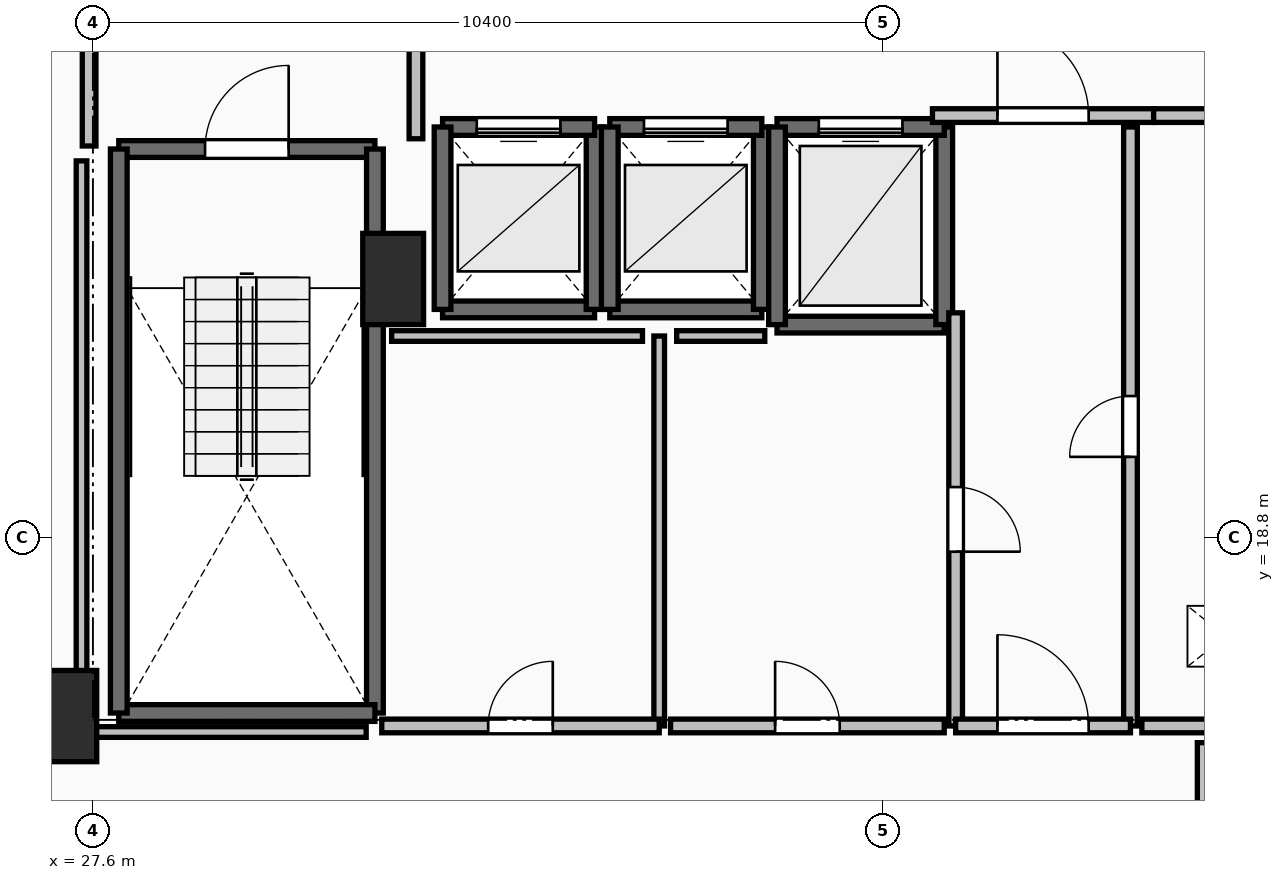
"""IFC4 building model, lengths in metres.
Left out: names, types, materials, properties, quantities, classifications, styles, units other than length and angle.
Written with IfcOpenShell. Run it as: python <this file> out.ifc"""

import sys

from ifc_helpers import new_model, si_unit, direction, frame, frame_2d, origin, origin_2d, place, context, subcontext, project, spatial, rectangle, extrude, element, fill, save


model = new_model("IFC4")
c1 = context("Model", 3, precision=1e-05, world=origin(), true_north=direction((0.0, 1.0)))
c2 = subcontext(c1, "Body", "Model", "MODEL_VIEW")
j1 = project(units=[si_unit("LENGTHUNIT", "METRE"), si_unit("PLANEANGLEUNIT", "RADIAN")], contexts=[c1])
p1 = place(None, origin())
s1 = spatial("IfcSite", under=j1, at=p1, CompositionType="ELEMENT")
p2 = place(p1, origin())
s2 = spatial("IfcBuilding", under=s1, at=p2, CompositionType="ELEMENT")
p3 = place(p2, frame((0.0, 0.0, 143.1)))
s3 = spatial("IfcBuildingStorey", under=s2, at=p3, CompositionType="ELEMENT", Elevation=143.1)
for number, where, z_axis, x_axis in (
    (1, (27.25, 16.45, 0.0), (0.0, 0.0, 1.0), (1.0, 0.0, 0.0)),
    (2, (31.55, 22.2, 0.0), (0.0, 0.0, 1.0), (1.0, 0.0, 0.0)),
):
    element("IfcColumn", number, at=place(p3, frame(where, z_axis=z_axis, x_axis=x_axis)), inside=s3, PredefinedType="PILASTER", context=c2, shape_type="SweptSolid", body=[
        extrude(rectangle(XDim=0.8, YDim=1.2, at=origin_2d()), origin(), (0.0, 0.0, 1.0), 3.5),
    ])
p4 = place(p3, frame((27.94, 23.91, 0.0), z_axis=(0.0, 0.0, 1.0), x_axis=(1.0, 0.0, 0.0)))
e3 = element("IfcWall", 3, at=p4, inside=s3, PredefinedType="SOLIDWALL", context=c2, shape_type="SweptSolid", body=[
    extrude(rectangle(XDim=3.37, YDim=0.22, at=frame_2d((1.685, 0.0))), origin(), (0.0, 0.0, 1.0), 3.24),
])
p5 = place(p4, frame((1.135, 0.0, 0.0)))
e4 = element("IfcOpeningElement", 4, at=p5, cuts=e3, PredefinedType="OPENING", context=c2, shape_type="SweptSolid", body=[
    extrude(rectangle(XDim=1.1, YDim=2.15, at=frame_2d((0.55, 1.075))), frame((0.0, 0.125, 0.0), z_axis=(0.0, -1.0, 0.0), x_axis=(1.0, 0.0, 0.0)), (0.0, 0.0, 1.0), 0.25),
])
p6 = place(p3, frame((31.31, 23.91, 0.0), z_axis=(0.0, 0.0, 1.0), x_axis=(0.0, -1.0, 0.0)))
e5 = element("IfcWall", 5, at=p6, inside=s3, PredefinedType="SOLIDWALL", context=c2, shape_type="SweptSolid", body=[
    extrude(rectangle(XDim=7.42, YDim=0.22, at=frame_2d((3.71, 0.0))), origin(), (0.0, 0.0, 1.0), 3.24),
])
p7 = place(p3, frame((31.31, 16.49, 0.0), z_axis=(0.0, 0.0, 1.0), x_axis=(-1.0, 0.0, 0.0)))
e6 = element("IfcWall", 6, at=p7, inside=s3, PredefinedType="SOLIDWALL", context=c2, shape_type="SweptSolid", body=[
    extrude(rectangle(XDim=3.37, YDim=0.22, at=frame_2d((1.685, 0.0))), origin(), (0.0, 0.0, 1.0), 3.24),
])
p8 = place(p3, frame((27.94, 16.49, 0.0), z_axis=(0.0, 0.0, 1.0), x_axis=(0.0, 1.0, 0.0)))
e7 = element("IfcWall", 7, at=p8, inside=s3, PredefinedType="SOLIDWALL", context=c2, shape_type="SweptSolid", body=[
    extrude(rectangle(XDim=7.42, YDim=0.22, at=frame_2d((3.71, 0.0))), origin(), (0.0, 0.0, 1.0), 3.24),
])
p9 = place(p3, frame((32.2, 21.8, 0.0), z_axis=(0.0, 0.0, 1.0), x_axis=(1.0, 0.0, 0.0)))
e8 = element("IfcWall", 8, at=p9, inside=s3, PredefinedType="SOLIDWALL", context=c2, shape_type="SweptSolid", body=[
    extrude(rectangle(XDim=2.0, YDim=0.22, at=frame_2d((1.0, 0.0))), origin(), (0.0, 0.0, 1.0), 3.24),
])
p10 = place(p3, frame((34.2, 21.8, 0.0), z_axis=(0.0, 0.0, 1.0), x_axis=(0.0, 1.0, 0.0)))
e9 = element("IfcWall", 9, at=p10, inside=s3, PredefinedType="SOLIDWALL", context=c2, shape_type="SweptSolid", body=[
    extrude(rectangle(XDim=2.4, YDim=0.22, at=frame_2d((1.2, 0.0))), origin(), (0.0, 0.0, 1.0), 3.24),
])
p11 = place(p3, frame((34.2, 24.2, 0.0), z_axis=(0.0, 0.0, 1.0), x_axis=(-1.0, 0.0, 0.0)))
e10 = element("IfcWall", 10, at=p11, inside=s3, PredefinedType="SOLIDWALL", context=c2, shape_type="SweptSolid", body=[
    extrude(rectangle(XDim=2.0, YDim=0.22, at=frame_2d((1.0, 0.0))), origin(), (0.0, 0.0, 1.0), 3.24),
])
p12 = place(p11, frame((0.45, 0.0, 0.0)))
e11 = element("IfcOpeningElement", 11, at=p12, cuts=e10, PredefinedType="OPENING", context=c2, shape_type="SweptSolid", body=[
    extrude(rectangle(XDim=1.1, YDim=2.2, at=frame_2d((0.55, 1.1))), frame((0.0, 0.125, 0.0), z_axis=(0.0, -1.0, 0.0), x_axis=(1.0, 0.0, 0.0)), (0.0, 0.0, 1.0), 0.25),
])
p13 = place(p3, frame((32.2, 24.2, 0.0), z_axis=(0.0, 0.0, 1.0), x_axis=(0.0, -1.0, 0.0)))
e12 = element("IfcWall", 12, at=p13, inside=s3, PredefinedType="SOLIDWALL", context=c2, shape_type="SweptSolid", body=[
    extrude(rectangle(XDim=2.4, YDim=0.22, at=frame_2d((1.2, 0.0))), origin(), (0.0, 0.0, 1.0), 3.24),
])
p14 = place(p3, frame((34.4, 21.8, 0.0), z_axis=(0.0, 0.0, 1.0), x_axis=(1.0, 0.0, 0.0)))
e13 = element("IfcWall", 13, at=p14, inside=s3, PredefinedType="SOLIDWALL", context=c2, shape_type="SweptSolid", body=[
    extrude(rectangle(XDim=2.0, YDim=0.22, at=frame_2d((1.0, 0.0))), origin(), (0.0, 0.0, 1.0), 3.24),
])
p15 = place(p3, frame((36.4, 21.8, 0.0), z_axis=(0.0, 0.0, 1.0), x_axis=(0.0, 1.0, 0.0)))
e14 = element("IfcWall", 14, at=p15, inside=s3, PredefinedType="SOLIDWALL", context=c2, shape_type="SweptSolid", body=[
    extrude(rectangle(XDim=2.4, YDim=0.22, at=frame_2d((1.2, 0.0))), origin(), (0.0, 0.0, 1.0), 3.24),
])
p16 = place(p3, frame((36.4, 24.2, 0.0), z_axis=(0.0, 0.0, 1.0), x_axis=(-1.0, 0.0, 0.0)))
e15 = element("IfcWall", 15, at=p16, inside=s3, PredefinedType="SOLIDWALL", context=c2, shape_type="SweptSolid", body=[
    extrude(rectangle(XDim=2.0, YDim=0.22, at=frame_2d((1.0, 0.0))), origin(), (0.0, 0.0, 1.0), 3.24),
])
p17 = place(p16, frame((0.45, 0.0, 0.0)))
e16 = element("IfcOpeningElement", 16, at=p17, cuts=e15, PredefinedType="OPENING", context=c2, shape_type="SweptSolid", body=[
    extrude(rectangle(XDim=1.1, YDim=2.2, at=frame_2d((0.55, 1.1))), frame((0.0, 0.125, 0.0), z_axis=(0.0, -1.0, 0.0), x_axis=(1.0, 0.0, 0.0)), (0.0, 0.0, 1.0), 0.25),
])
p18 = place(p3, frame((34.4, 24.2, 0.0), z_axis=(0.0, 0.0, 1.0), x_axis=(0.0, -1.0, 0.0)))
e17 = element("IfcWall", 17, at=p18, inside=s3, PredefinedType="SOLIDWALL", context=c2, shape_type="SweptSolid", body=[
    extrude(rectangle(XDim=2.4, YDim=0.22, at=frame_2d((1.2, 0.0))), origin(), (0.0, 0.0, 1.0), 3.24),
])
p19 = place(p3, frame((36.6, 21.6, 0.0), z_axis=(0.0, 0.0, 1.0), x_axis=(1.0, 0.0, 0.0)))
e18 = element("IfcWall", 18, at=p19, inside=s3, PredefinedType="SOLIDWALL", context=c2, shape_type="SweptSolid", body=[
    extrude(rectangle(XDim=2.2, YDim=0.22, at=frame_2d((1.1, 0.0))), origin(), (0.0, 0.0, 1.0), 3.24),
])
p20 = place(p3, frame((38.8, 21.6, 0.0), z_axis=(0.0, 0.0, 1.0), x_axis=(0.0, 1.0, 0.0)))
e19 = element("IfcWall", 19, at=p20, inside=s3, PredefinedType="SOLIDWALL", context=c2, shape_type="SweptSolid", body=[
    extrude(rectangle(XDim=2.6, YDim=0.22, at=frame_2d((1.3, 0.0))), origin(), (0.0, 0.0, 1.0), 3.24),
])
p21 = place(p3, frame((38.8, 24.2, 0.0), z_axis=(0.0, 0.0, 1.0), x_axis=(-1.0, 0.0, 0.0)))
e20 = element("IfcWall", 20, at=p21, inside=s3, PredefinedType="SOLIDWALL", context=c2, shape_type="SweptSolid", body=[
    extrude(rectangle(XDim=2.2, YDim=0.22, at=frame_2d((1.1, 0.0))), origin(), (0.0, 0.0, 1.0), 3.24),
])
p22 = place(p21, frame((0.55, 0.0, 0.0)))
e21 = element("IfcOpeningElement", 21, at=p22, cuts=e20, PredefinedType="OPENING", context=c2, shape_type="SweptSolid", body=[
    extrude(rectangle(XDim=1.1, YDim=2.2, at=frame_2d((0.55, 1.1))), frame((0.0, 0.125, 0.0), z_axis=(0.0, -1.0, 0.0), x_axis=(1.0, 0.0, 0.0)), (0.0, 0.0, 1.0), 0.25),
])
p23 = place(p3, frame((36.6, 24.2, 0.0), z_axis=(0.0, 0.0, 1.0), x_axis=(0.0, -1.0, 0.0)))
e22 = element("IfcWall", 22, at=p23, inside=s3, PredefinedType="SOLIDWALL", context=c2, shape_type="SweptSolid", body=[
    extrude(rectangle(XDim=2.6, YDim=0.22, at=frame_2d((1.3, 0.0))), origin(), (0.0, 0.0, 1.0), 3.24),
])
p24 = place(p3, frame((31.85, 24.045, 0.0), z_axis=(0.0, 0.0, 1.0), x_axis=(0.0, 1.0, 0.0)))
e23 = element("IfcWall", 23, at=p24, inside=s3, PredefinedType="PARTITIONING", context=c2, shape_type="SweptSolid", body=[
    extrude(rectangle(XDim=3.91, YDim=0.18, at=frame_2d((1.955, 0.0))), origin(), (0.0, 0.0, 1.0), 3.24),
])
p25 = place(p24, frame((1.355, 0.0, 0.0)))
e24 = element("IfcOpeningElement", 24, at=p25, cuts=e23, PredefinedType="OPENING", context=c2, shape_type="SweptSolid", body=[
    extrude(rectangle(XDim=1.2, YDim=2.15, at=frame_2d((0.6, 1.075))), frame((0.0, 0.105, 0.0), z_axis=(0.0, -1.0, 0.0), x_axis=(1.0, 0.0, 0.0)), (0.0, 0.0, 1.0), 0.21),
])
p26 = place(p3, frame((27.55, 28.0, 0.0), z_axis=(0.0, 0.0, 1.0), x_axis=(0.0, -1.0, 0.0)))
e25 = element("IfcWall", 25, at=p26, inside=s3, PredefinedType="PARTITIONING", context=c2, shape_type="SweptSolid", body=[
    extrude(rectangle(XDim=4.05, YDim=0.18, at=frame_2d((2.025, 0.0))), origin(), (0.0, 0.0, 1.0), 3.24),
])
p27 = place(p26, frame((1.425, 0.0, 0.0)))
e26 = element("IfcOpeningElement", 26, at=p27, cuts=e25, PredefinedType="OPENING", context=c2, shape_type="SweptSolid", body=[
    extrude(rectangle(XDim=1.2, YDim=2.15, at=frame_2d((0.6, 1.075))), frame((0.0, 0.105, 0.0), z_axis=(0.0, -1.0, 0.0), x_axis=(1.0, 0.0, 0.0)), (0.0, 0.0, 1.0), 0.21),
])
p28 = place(p3, frame((38.645, 24.35, 0.0), z_axis=(0.0, 0.0, 1.0), x_axis=(1.0, 0.0, 0.0)))
e27 = element("IfcWall", 27, at=p28, inside=s3, PredefinedType="PARTITIONING", context=c2, shape_type="SweptSolid", body=[
    extrude(rectangle(XDim=2.91, YDim=0.18, at=frame_2d((1.455, 0.0))), origin(), (0.0, 0.0, 1.0), 3.24),
])
p29 = place(p28, frame((0.855, 0.0, 0.0)))
e28 = element("IfcOpeningElement", 28, at=p29, cuts=e27, PredefinedType="OPENING", context=c2, shape_type="SweptSolid", body=[
    extrude(rectangle(XDim=1.2, YDim=2.15, at=frame_2d((0.6, 1.075))), frame((0.0, 0.105, 0.0), z_axis=(0.0, -1.0, 0.0), x_axis=(1.0, 0.0, 0.0)), (0.0, 0.0, 1.0), 0.21),
])
p30 = place(p3, frame((41.555, 24.35, 0.0), z_axis=(0.0, 0.0, 1.0), x_axis=(1.0, 0.0, 0.0)))
e29 = element("IfcWall", 29, at=p30, inside=s3, PredefinedType="PARTITIONING", context=c2, shape_type="SweptSolid", body=[
    extrude(rectangle(XDim=2.445, YDim=0.18, at=frame_2d((1.223, 0.0))), origin(), (0.0, 0.0, 1.0), 3.24),
])
p31 = place(p30, frame((0.823, 0.0, 0.0)))
e30 = element("IfcOpeningElement", 30, at=p31, cuts=e29, PredefinedType="OPENING", context=c2, shape_type="SweptSolid", body=[
    extrude(rectangle(XDim=0.8, YDim=2.05, at=frame_2d((0.4, 1.025))), frame((0.0, 0.105, 0.0), z_axis=(0.0, -1.0, 0.0), x_axis=(1.0, 0.0, 0.0)), (0.0, 0.0, 1.0), 0.21),
])
p32 = place(p3, frame((41.25, 16.32, 0.0), z_axis=(0.0, 0.0, 1.0), x_axis=(0.0, 1.0, 0.0)))
e31 = element("IfcWall", 31, at=p32, inside=s3, PredefinedType="PARTITIONING", context=c2, shape_type="SweptSolid", body=[
    extrude(rectangle(XDim=7.88, YDim=0.18, at=frame_2d((3.94, 0.0))), origin(), (0.0, 0.0, 1.0), 3.24),
])
p33 = place(p32, frame((3.54, 0.0, 0.0)))
e32 = element("IfcOpeningElement", 32, at=p33, cuts=e31, PredefinedType="OPENING", context=c2, shape_type="SweptSolid", body=[
    extrude(rectangle(XDim=0.8, YDim=2.05, at=frame_2d((0.4, 1.025))), frame((0.0, 0.105, 0.0), z_axis=(0.0, -1.0, 0.0), x_axis=(1.0, 0.0, 0.0)), (0.0, 0.0, 1.0), 0.21),
])
p34 = place(p3, frame((38.95, 21.755, 0.0), z_axis=(0.0, 0.0, 1.0), x_axis=(0.0, -1.0, 0.0)))
e33 = element("IfcWall", 33, at=p34, inside=s3, PredefinedType="PARTITIONING", context=c2, shape_type="SweptSolid", body=[
    extrude(rectangle(XDim=5.435, YDim=0.18, at=frame_2d((2.717, 0.0))), origin(), (0.0, 0.0, 1.0), 3.24),
])
p35 = place(p34, frame((2.292, 0.0, 0.0)))
e34 = element("IfcOpeningElement", 34, at=p35, cuts=e33, PredefinedType="OPENING", context=c2, shape_type="SweptSolid", body=[
    extrude(rectangle(XDim=0.85, YDim=2.1, at=frame_2d((0.425, 1.05))), frame((0.0, 0.105, 0.0), z_axis=(0.0, -1.0, 0.0), x_axis=(1.0, 0.0, 0.0)), (0.0, 0.0, 1.0), 0.21),
])
p36 = place(p3, frame((38.95, 16.32, 0.0), z_axis=(0.0, 0.0, 1.0), x_axis=(1.0, 0.0, 0.0)))
e35 = element("IfcWall", 35, at=p36, inside=s3, PredefinedType="PARTITIONING", context=c2, shape_type="SweptSolid", body=[
    extrude(rectangle(XDim=2.3, YDim=0.18, at=frame_2d((1.15, 0.0))), origin(), (0.0, 0.0, 1.0), 3.24),
])
p37 = place(p36, frame((0.55, 0.0, 0.0)))
e36 = element("IfcOpeningElement", 36, at=p37, cuts=e35, PredefinedType="OPENING", context=c2, shape_type="SweptSolid", body=[
    extrude(rectangle(XDim=1.2, YDim=2.15, at=frame_2d((0.6, 1.075))), frame((0.0, 0.105, 0.0), z_axis=(0.0, -1.0, 0.0), x_axis=(1.0, 0.0, 0.0)), (0.0, 0.0, 1.0), 0.21),
])
p38 = place(p3, frame((41.4, 16.32, 0.0), z_axis=(0.0, 0.0, 1.0), x_axis=(1.0, 0.0, 0.0)))
e37 = element("IfcWall", 37, at=p38, inside=s3, PredefinedType="PARTITIONING", context=c2, shape_type="SweptSolid", body=[
    extrude(rectangle(XDim=3.2, YDim=0.18, at=frame_2d((1.6, 0.0))), origin(), (0.0, 0.0, 1.0), 3.24),
])
p39 = place(p38, frame((1.2, 0.0, 0.0)))
e38 = element("IfcOpeningElement", 38, at=p39, cuts=e37, PredefinedType="OPENING", context=c2, shape_type="SweptSolid", body=[
    extrude(rectangle(XDim=0.8, YDim=2.05, at=frame_2d((0.4, 1.025))), frame((0.0, 0.105, 0.0), z_axis=(0.0, -1.0, 0.0), x_axis=(1.0, 0.0, 0.0)), (0.0, 0.0, 1.0), 0.21),
])
p40 = place(p3, frame((35.05, 16.32, 0.0), z_axis=(0.0, 0.0, 1.0), x_axis=(0.0, 1.0, 0.0)))
e39 = element("IfcWall", 39, at=p40, inside=s3, PredefinedType="PARTITIONING", context=c2, shape_type="SweptSolid", body=[
    extrude(rectangle(XDim=5.13, YDim=0.14, at=frame_2d((2.565, 0.0))), origin(), (0.0, 0.0, 1.0), 3.24),
])
p41 = place(p3, frame((31.4, 16.32, 0.0), z_axis=(0.0, 0.0, 1.0), x_axis=(1.0, 0.0, 0.0)))
e40 = element("IfcWall", 40, at=p41, inside=s3, PredefinedType="PARTITIONING", context=c2, shape_type="SweptSolid", body=[
    extrude(rectangle(XDim=3.65, YDim=0.18, at=frame_2d((1.825, 0.0))), origin(), (0.0, 0.0, 1.0), 3.24),
])
p42 = place(p41, frame((1.4, 0.0, 0.0)))
e41 = element("IfcOpeningElement", 41, at=p42, cuts=e40, PredefinedType="OPENING", context=c2, shape_type="SweptSolid", body=[
    extrude(rectangle(XDim=0.85, YDim=2.1, at=frame_2d((0.425, 1.05))), frame((0.0, 0.105, 0.0), z_axis=(0.0, -1.0, 0.0), x_axis=(1.0, 0.0, 0.0)), (0.0, 0.0, 1.0), 0.21),
])
p43 = place(p3, frame((35.2, 16.32, 0.0), z_axis=(0.0, 0.0, 1.0), x_axis=(1.0, 0.0, 0.0)))
e42 = element("IfcWall", 42, at=p43, inside=s3, PredefinedType="PARTITIONING", context=c2, shape_type="SweptSolid", body=[
    extrude(rectangle(XDim=3.6, YDim=0.18, at=frame_2d((1.8, 0.0))), origin(), (0.0, 0.0, 1.0), 3.24),
])
p44 = place(p43, frame((1.375, 0.0, 0.0)))
e43 = element("IfcOpeningElement", 43, at=p44, cuts=e42, PredefinedType="OPENING", context=c2, shape_type="SweptSolid", body=[
    extrude(rectangle(XDim=0.85, YDim=2.1, at=frame_2d((0.425, 1.05))), frame((0.0, 0.105, 0.0), z_axis=(0.0, -1.0, 0.0), x_axis=(1.0, 0.0, 0.0)), (0.0, 0.0, 1.0), 0.21),
])
p45 = place(p3, frame((34.83, 21.45, 0.0), z_axis=(0.0, 0.0, 1.0), x_axis=(-1.0, 0.0, 0.0)))
e44 = element("IfcWall", 44, at=p45, inside=s3, PredefinedType="PARTITIONING", context=c2, shape_type="SweptSolid", body=[
    extrude(rectangle(XDim=3.3, YDim=0.14, at=frame_2d((1.65, 0.0))), origin(), (0.0, 0.0, 1.0), 3.24),
])
p46 = place(p3, frame((36.439, 21.45, 0.0), z_axis=(0.0, 0.0, 1.0), x_axis=(-1.0, 0.0, 0.0)))
e45 = element("IfcWall", 45, at=p46, inside=s3, PredefinedType="PARTITIONING", context=c2, shape_type="SweptSolid", body=[
    extrude(rectangle(XDim=1.159, YDim=0.14, at=frame_2d((0.58, 0.0))), origin(), (0.0, 0.0, 1.0), 3.24),
])
p47 = place(p3, frame((27.45, 23.754, 0.0), z_axis=(0.0, 0.0, 1.0), x_axis=(0.0, -1.0, 0.0)))
e46 = element("IfcWall", 46, at=p47, inside=s3, PredefinedType="PARTITIONING", context=c2, shape_type="SweptSolid", body=[
    extrude(rectangle(XDim=7.514, YDim=0.14, at=frame_2d((3.757, 0.0))), origin(), (0.0, 0.0, 1.0), 2.432),
])
p48 = place(p3, frame((27.45, 16.24, 0.0), z_axis=(0.0, 0.0, 1.0), x_axis=(1.0, 0.0, 0.0)))
e47 = element("IfcWall", 47, at=p48, inside=s3, PredefinedType="PARTITIONING", context=c2, shape_type="SweptSolid", body=[
    extrude(rectangle(XDim=3.745, YDim=0.14, at=frame_2d((1.873, 0.0))), origin(), (0.0, 0.0, 1.0), 2.432),
])
p49 = place(p3, frame((42.2, 16.1, 0.0), z_axis=(0.0, 0.0, 1.0), x_axis=(0.0, -1.0, 0.0)))
e48 = element("IfcWall", 48, at=p49, inside=s3, PredefinedType="PARTITIONING", context=c2, shape_type="SweptSolid", body=[
    extrude(rectangle(XDim=1.83, YDim=0.14, at=frame_2d((0.915, 0.0))), origin(), (0.0, 0.0, 1.0), 3.24),
])
p50 = place(p5, origin())
e49 = element("IfcDoor", 49, at=p50, inside=s3, OperationType="SINGLE_SWING_RIGHT", PredefinedType="DOOR", context=c2, shape_type="SweptSolid", body=[
    extrude(rectangle(XDim=1.1, YDim=2.15, at=frame_2d((0.55, 1.075))), frame((0.0, 0.025, 0.0), z_axis=(0.0, -1.0, 0.0), x_axis=(1.0, 0.0, 0.0)), (0.0, 0.0, 1.0), 0.05),
])
fill(e4, e49)
p51 = place(p12, origin())
e50 = element("IfcDoor", 50, at=p51, inside=s3, OperationType="SLIDING_TO_LEFT", PredefinedType="DOOR", context=c2, shape_type="SweptSolid", body=[
    extrude(rectangle(XDim=1.1, YDim=2.2, at=frame_2d((0.55, 1.1))), frame((0.0, 0.025, 0.0), z_axis=(0.0, -1.0, 0.0), x_axis=(1.0, 0.0, 0.0)), (0.0, 0.0, 1.0), 0.05),
])
fill(e11, e50)
p52 = place(p17, origin())
e51 = element("IfcDoor", 51, at=p52, inside=s3, OperationType="SLIDING_TO_LEFT", PredefinedType="DOOR", context=c2, shape_type="SweptSolid", body=[
    extrude(rectangle(XDim=1.1, YDim=2.2, at=frame_2d((0.55, 1.1))), frame((0.0, 0.025, 0.0), z_axis=(0.0, -1.0, 0.0), x_axis=(1.0, 0.0, 0.0)), (0.0, 0.0, 1.0), 0.05),
])
fill(e16, e51)
p53 = place(p22, origin())
e52 = element("IfcDoor", 52, at=p53, inside=s3, OperationType="SLIDING_TO_LEFT", PredefinedType="DOOR", context=c2, shape_type="SweptSolid", body=[
    extrude(rectangle(XDim=1.1, YDim=2.2, at=frame_2d((0.55, 1.1))), frame((0.0, 0.025, 0.0), z_axis=(0.0, -1.0, 0.0), x_axis=(1.0, 0.0, 0.0)), (0.0, 0.0, 1.0), 0.05),
])
fill(e21, e52)
p54 = place(p29, origin())
e53 = element("IfcDoor", 53, at=p54, inside=s3, OperationType="SINGLE_SWING_LEFT", PredefinedType="DOOR", context=c2, shape_type="SweptSolid", body=[
    extrude(rectangle(XDim=1.2, YDim=2.15, at=frame_2d((0.6, 1.075))), frame((0.0, 0.025, 0.0), z_axis=(0.0, -1.0, 0.0), x_axis=(1.0, 0.0, 0.0)), (0.0, 0.0, 1.0), 0.05),
])
fill(e28, e53)
p55 = place(p33, origin())
e54 = element("IfcDoor", 54, at=p55, inside=s3, OperationType="SINGLE_SWING_LEFT", PredefinedType="DOOR", context=c2, shape_type="SweptSolid", body=[
    extrude(rectangle(XDim=0.8, YDim=2.05, at=frame_2d((0.4, 1.025))), frame((0.0, 0.025, 0.0), z_axis=(0.0, -1.0, 0.0), x_axis=(1.0, 0.0, 0.0)), (0.0, 0.0, 1.0), 0.05),
])
fill(e32, e54)
p56 = place(p35, origin())
e55 = element("IfcDoor", 55, at=p56, inside=s3, OperationType="SINGLE_SWING_RIGHT", PredefinedType="DOOR", context=c2, shape_type="SweptSolid", body=[
    extrude(rectangle(XDim=0.85, YDim=2.1, at=frame_2d((0.425, 1.05))), frame((0.0, 0.025, 0.0), z_axis=(0.0, -1.0, 0.0), x_axis=(1.0, 0.0, 0.0)), (0.0, 0.0, 1.0), 0.05),
])
fill(e34, e55)
p57 = place(p37, origin())
e56 = element("IfcDoor", 56, at=p57, inside=s3, OperationType="SINGLE_SWING_LEFT", PredefinedType="DOOR", context=c2, shape_type="SweptSolid", body=[
    extrude(rectangle(XDim=1.2, YDim=2.15, at=frame_2d((0.6, 1.075))), frame((0.0, 0.025, 0.0), z_axis=(0.0, -1.0, 0.0), x_axis=(1.0, 0.0, 0.0)), (0.0, 0.0, 1.0), 0.05),
])
fill(e36, e56)
p58 = place(p42, origin())
e57 = element("IfcDoor", 57, at=p58, inside=s3, OperationType="SINGLE_SWING_RIGHT", PredefinedType="DOOR", context=c2, shape_type="SweptSolid", body=[
    extrude(rectangle(XDim=0.85, YDim=2.1, at=frame_2d((0.425, 1.05))), frame((0.0, 0.025, 0.0), z_axis=(0.0, -1.0, 0.0), x_axis=(1.0, 0.0, 0.0)), (0.0, 0.0, 1.0), 0.05),
])
fill(e41, e57)
p59 = place(p44, origin())
e58 = element("IfcDoor", 58, at=p59, inside=s3, OperationType="SINGLE_SWING_LEFT", PredefinedType="DOOR", context=c2, shape_type="SweptSolid", body=[
    extrude(rectangle(XDim=0.85, YDim=2.1, at=frame_2d((0.425, 1.05))), frame((0.0, 0.025, 0.0), z_axis=(0.0, -1.0, 0.0), x_axis=(1.0, 0.0, 0.0)), (0.0, 0.0, 1.0), 0.05),
])
fill(e43, e58)
save(model, sys.argv[1])
